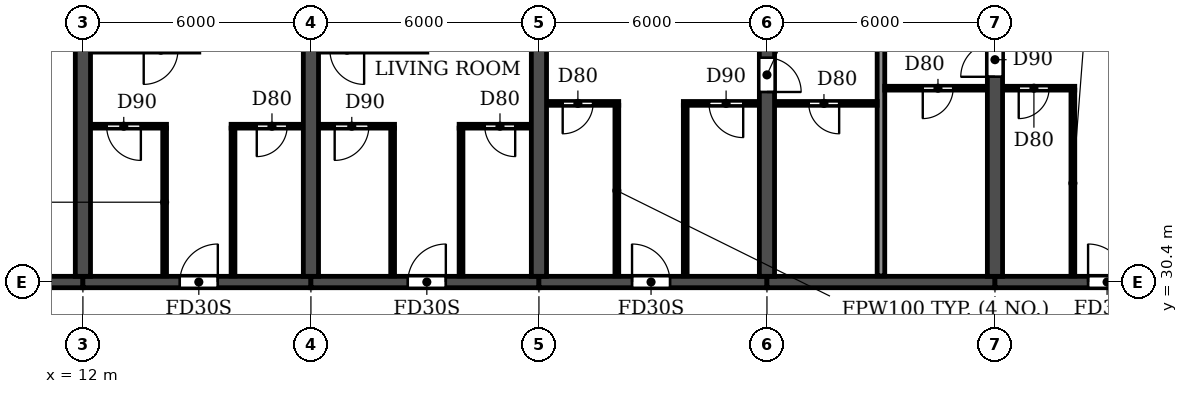
"""IFC4 building model, lengths in metres.
Left out: names, types, materials, properties, quantities, classifications, styles, units other than length and angle.
Written with IfcOpenShell. Run it as: python <this file> out.ifc"""

import sys

from ifc_helpers import new_model, si_unit, direction, frame, frame_2d, origin, place, context, subcontext, project, spatial, rectangle, extrude, element, fill, save


model = new_model("IFC4")
c1 = context("Model", 3, precision=1e-05, world=origin(), true_north=direction((0.0, 1.0)))
c2 = subcontext(c1, "Body", "Model", "MODEL_VIEW")
j1 = project(units=[si_unit("LENGTHUNIT", "METRE"), si_unit("PLANEANGLEUNIT", "RADIAN")], contexts=[c1])
p1 = place(None, origin())
s1 = spatial("IfcSite", under=j1, at=p1, CompositionType="ELEMENT")
p2 = place(p1, origin())
s2 = spatial("IfcBuilding", under=s1, at=p2, CompositionType="ELEMENT")
p3 = place(p2, frame((0.0, 0.0, 56.4)))
s3 = spatial("IfcBuildingStorey", under=s2, at=p3, CompositionType="ELEMENT", Elevation=56.4)
for number, where, z_axis, x_axis in (
    (1, (12.0, 30.55, 0.0), (0.0, 0.0, 1.0), (0.0, 1.0, 0.0)),
    (2, (18.0, 30.55, 0.0), (0.0, 0.0, 1.0), (0.0, 1.0, 0.0)),
    (3, (24.0, 30.55, 0.0), (0.0, 0.0, 1.0), (0.0, 1.0, 0.0)),
):
    element("IfcWall", number, at=place(p3, frame(where, z_axis=z_axis, x_axis=x_axis)), inside=s3, PredefinedType="SHEAR", context=c2, shape_type="SweptSolid", body=[
        extrude(rectangle(XDim=14.05, YDim=0.4, at=frame_2d((7.025, 0.0))), origin(), (0.0, 0.0, 1.0), 3.05),
    ])
p4 = place(p3, frame((30.0, 30.55, 0.0), z_axis=(0.0, 0.0, 1.0), x_axis=(0.0, 1.0, 0.0)))
e4 = element("IfcWall", 4, at=p4, inside=s3, PredefinedType="SHEAR", context=c2, shape_type="SweptSolid", body=[
    extrude(rectangle(XDim=14.05, YDim=0.4, at=frame_2d((7.025, 0.0))), origin(), (0.0, 0.0, 1.0), 3.05),
])
p5 = place(p4, frame((4.85, 0.0, 0.0)))
e5 = element("IfcOpeningElement", 5, at=p5, cuts=e4, PredefinedType="OPENING", context=c2, shape_type="SweptSolid", body=[
    extrude(rectangle(XDim=0.9, YDim=2.1, at=frame_2d((0.45, 1.05))), frame((0.0, 0.21, 0.0), z_axis=(0.0, -1.0, 0.0), x_axis=(1.0, 0.0, 0.0)), (0.0, 0.0, 1.0), 0.42),
])
p6 = place(p3, frame((36.0, 30.55, 0.0), z_axis=(0.0, 0.0, 1.0), x_axis=(0.0, 1.0, 0.0)))
e6 = element("IfcWall", 6, at=p6, inside=s3, PredefinedType="SHEAR", context=c2, shape_type="SweptSolid", body=[
    extrude(rectangle(XDim=14.05, YDim=0.4, at=frame_2d((7.025, 0.0))), origin(), (0.0, 0.0, 1.0), 3.05),
])
p7 = place(p6, frame((5.25, 0.0, 0.0)))
e7 = element("IfcOpeningElement", 7, at=p7, cuts=e6, PredefinedType="OPENING", context=c2, shape_type="SweptSolid", body=[
    extrude(rectangle(XDim=0.9, YDim=2.1, at=frame_2d((0.45, 1.05))), frame((0.0, 0.21, 0.0), z_axis=(0.0, -1.0, 0.0), x_axis=(1.0, 0.0, 0.0)), (0.0, 0.0, 1.0), 0.42),
])
p8 = place(p3, frame((6.2, 30.4, 0.0), z_axis=(0.0, 0.0, 1.0), x_axis=(1.0, 0.0, 0.0)))
e8 = element("IfcWall", 8, at=p8, inside=s3, PredefinedType="SHEAR", context=c2, shape_type="SweptSolid", body=[
    extrude(rectangle(XDim=5.8, YDim=0.3, at=frame_2d((2.9, 0.0))), origin(), (0.0, 0.0, 1.0), 2.45),
])
p9 = place(p8, frame((2.3, 0.0, 0.0)))
e9 = element("IfcOpeningElement", 9, at=p9, cuts=e8, PredefinedType="OPENING", context=c2, shape_type="SweptSolid", body=[
    extrude(rectangle(XDim=1.0, YDim=2.1, at=frame_2d((0.5, 1.05))), frame((0.0, 0.16, 0.0), z_axis=(0.0, -1.0, 0.0), x_axis=(1.0, 0.0, 0.0)), (0.0, 0.0, 1.0), 0.32),
])
p10 = place(p3, frame((12.0, 30.4, 0.0), z_axis=(0.0, 0.0, 1.0), x_axis=(1.0, 0.0, 0.0)))
e10 = element("IfcWall", 10, at=p10, inside=s3, PredefinedType="SHEAR", context=c2, shape_type="SweptSolid", body=[
    extrude(rectangle(XDim=6.0, YDim=0.3, at=frame_2d((3.0, 0.0))), origin(), (0.0, 0.0, 1.0), 2.45),
])
p11 = place(p10, frame((2.55, 0.0, 0.0)))
e11 = element("IfcOpeningElement", 11, at=p11, cuts=e10, PredefinedType="OPENING", context=c2, shape_type="SweptSolid", body=[
    extrude(rectangle(XDim=1.0, YDim=2.1, at=frame_2d((0.5, 1.05))), frame((0.0, 0.16, 0.0), z_axis=(0.0, -1.0, 0.0), x_axis=(1.0, 0.0, 0.0)), (0.0, 0.0, 1.0), 0.32),
])
p12 = place(p3, frame((18.0, 30.4, 0.0), z_axis=(0.0, 0.0, 1.0), x_axis=(1.0, 0.0, 0.0)))
e12 = element("IfcWall", 12, at=p12, inside=s3, PredefinedType="SHEAR", context=c2, shape_type="SweptSolid", body=[
    extrude(rectangle(XDim=6.0, YDim=0.3, at=frame_2d((3.0, 0.0))), origin(), (0.0, 0.0, 1.0), 2.45),
])
p13 = place(p12, frame((2.55, 0.0, 0.0)))
e13 = element("IfcOpeningElement", 13, at=p13, cuts=e12, PredefinedType="OPENING", context=c2, shape_type="SweptSolid", body=[
    extrude(rectangle(XDim=1.0, YDim=2.1, at=frame_2d((0.5, 1.05))), frame((0.0, 0.16, 0.0), z_axis=(0.0, -1.0, 0.0), x_axis=(1.0, 0.0, 0.0)), (0.0, 0.0, 1.0), 0.32),
])
p14 = place(p3, frame((24.0, 30.4, 0.0), z_axis=(0.0, 0.0, 1.0), x_axis=(1.0, 0.0, 0.0)))
e14 = element("IfcWall", 14, at=p14, inside=s3, PredefinedType="SHEAR", context=c2, shape_type="SweptSolid", body=[
    extrude(rectangle(XDim=6.0, YDim=0.3, at=frame_2d((3.0, 0.0))), origin(), (0.0, 0.0, 1.0), 2.45),
])
p15 = place(p14, frame((2.45, 0.0, 0.0)))
e15 = element("IfcOpeningElement", 15, at=p15, cuts=e14, PredefinedType="OPENING", context=c2, shape_type="SweptSolid", body=[
    extrude(rectangle(XDim=1.0, YDim=2.1, at=frame_2d((0.5, 1.05))), frame((0.0, 0.16, 0.0), z_axis=(0.0, -1.0, 0.0), x_axis=(1.0, 0.0, 0.0)), (0.0, 0.0, 1.0), 0.32),
])
p16 = place(p3, frame((30.0, 30.4, 0.0), z_axis=(0.0, 0.0, 1.0), x_axis=(1.0, 0.0, 0.0)))
e16 = element("IfcWall", 16, at=p16, inside=s3, PredefinedType="SHEAR", context=c2, shape_type="SweptSolid", body=[
    extrude(rectangle(XDim=6.0, YDim=0.3, at=frame_2d((3.0, 0.0))), origin(), (0.0, 0.0, 1.0), 2.45),
])
p17 = place(p3, frame((36.0, 30.4, 0.0), z_axis=(0.0, 0.0, 1.0), x_axis=(1.0, 0.0, 0.0)))
e17 = element("IfcWall", 17, at=p17, inside=s3, PredefinedType="SHEAR", context=c2, shape_type="SweptSolid", body=[
    extrude(rectangle(XDim=6.0, YDim=0.3, at=frame_2d((3.0, 0.0))), origin(), (0.0, 0.0, 1.0), 2.45),
])
p18 = place(p17, frame((2.45, 0.0, 0.0)))
e18 = element("IfcOpeningElement", 18, at=p18, cuts=e17, PredefinedType="OPENING", context=c2, shape_type="SweptSolid", body=[
    extrude(rectangle(XDim=1.0, YDim=2.1, at=frame_2d((0.5, 1.05))), frame((0.0, 0.16, 0.0), z_axis=(0.0, -1.0, 0.0), x_axis=(1.0, 0.0, 0.0)), (0.0, 0.0, 1.0), 0.32),
])
p19 = place(p3, frame((33.0, 30.56, 0.0), z_axis=(0.0, 0.0, 1.0), x_axis=(0.0, 1.0, 0.0)))
e19 = element("IfcWall", 19, at=p19, inside=s3, PredefinedType="PARTITIONING", context=c2, shape_type="SweptSolid", body=[
    extrude(rectangle(XDim=14.18, YDim=0.2, at=frame_2d((7.09, 0.0))), origin(), (0.0, 0.0, 1.0), 3.05),
])
p20 = place(p3, frame((12.21, 34.5, 0.0), z_axis=(0.0, 0.0, 1.0), x_axis=(1.0, 0.0, 0.0)))
e20 = element("IfcWall", 20, at=p20, inside=s3, PredefinedType="PARTITIONING", context=c2, shape_type="SweptSolid", body=[
    extrude(rectangle(XDim=1.99, YDim=0.1, at=frame_2d((0.995, 0.0))), origin(), (0.0, 0.0, 1.0), 3.05),
])
p21 = place(p20, frame((0.415, 0.0, 0.0)))
e21 = element("IfcOpeningElement", 21, at=p21, cuts=e20, PredefinedType="OPENING", context=c2, shape_type="SweptSolid", body=[
    extrude(rectangle(XDim=0.9, YDim=2.1, at=frame_2d((0.45, 1.05))), frame((0.0, 0.06, 0.0), z_axis=(0.0, -1.0, 0.0), x_axis=(1.0, 0.0, 0.0)), (0.0, 0.0, 1.0), 0.12),
])
p22 = place(p3, frame((15.9, 34.5, 0.0), z_axis=(0.0, 0.0, 1.0), x_axis=(1.0, 0.0, 0.0)))
e22 = element("IfcWall", 22, at=p22, inside=s3, PredefinedType="PARTITIONING", context=c2, shape_type="SweptSolid", body=[
    extrude(rectangle(XDim=1.89, YDim=0.1, at=frame_2d((0.945, 0.0))), origin(), (0.0, 0.0, 1.0), 3.05),
])
p23 = place(p22, frame((0.675, 0.0, 0.0)))
e23 = element("IfcOpeningElement", 23, at=p23, cuts=e22, PredefinedType="OPENING", context=c2, shape_type="SweptSolid", body=[
    extrude(rectangle(XDim=0.8, YDim=2.1, at=frame_2d((0.4, 1.05))), frame((0.0, 0.06, 0.0), z_axis=(0.0, -1.0, 0.0), x_axis=(1.0, 0.0, 0.0)), (0.0, 0.0, 1.0), 0.12),
])
p24 = place(p3, frame((18.21, 34.5, 0.0), z_axis=(0.0, 0.0, 1.0), x_axis=(1.0, 0.0, 0.0)))
e24 = element("IfcWall", 24, at=p24, inside=s3, PredefinedType="PARTITIONING", context=c2, shape_type="SweptSolid", body=[
    extrude(rectangle(XDim=1.99, YDim=0.1, at=frame_2d((0.995, 0.0))), origin(), (0.0, 0.0, 1.0), 3.05),
])
p25 = place(p24, frame((0.415, 0.0, 0.0)))
e25 = element("IfcOpeningElement", 25, at=p25, cuts=e24, PredefinedType="OPENING", context=c2, shape_type="SweptSolid", body=[
    extrude(rectangle(XDim=0.9, YDim=2.1, at=frame_2d((0.45, 1.05))), frame((0.0, 0.06, 0.0), z_axis=(0.0, -1.0, 0.0), x_axis=(1.0, 0.0, 0.0)), (0.0, 0.0, 1.0), 0.12),
])
p26 = place(p3, frame((21.9, 34.5, 0.0), z_axis=(0.0, 0.0, 1.0), x_axis=(1.0, 0.0, 0.0)))
e26 = element("IfcWall", 26, at=p26, inside=s3, PredefinedType="PARTITIONING", context=c2, shape_type="SweptSolid", body=[
    extrude(rectangle(XDim=1.89, YDim=0.1, at=frame_2d((0.945, 0.0))), origin(), (0.0, 0.0, 1.0), 3.05),
])
p27 = place(p26, frame((0.675, 0.0, 0.0)))
e27 = element("IfcOpeningElement", 27, at=p27, cuts=e26, PredefinedType="OPENING", context=c2, shape_type="SweptSolid", body=[
    extrude(rectangle(XDim=0.8, YDim=2.1, at=frame_2d((0.4, 1.05))), frame((0.0, 0.06, 0.0), z_axis=(0.0, -1.0, 0.0), x_axis=(1.0, 0.0, 0.0)), (0.0, 0.0, 1.0), 0.12),
])
p28 = place(p3, frame((24.21, 35.1, 0.0), z_axis=(0.0, 0.0, 1.0), x_axis=(1.0, 0.0, 0.0)))
e28 = element("IfcWall", 28, at=p28, inside=s3, PredefinedType="PARTITIONING", context=c2, shape_type="SweptSolid", body=[
    extrude(rectangle(XDim=1.89, YDim=0.1, at=frame_2d((0.945, 0.0))), origin(), (0.0, 0.0, 1.0), 3.05),
])
p29 = place(p28, frame((0.415, 0.0, 0.0)))
e29 = element("IfcOpeningElement", 29, at=p29, cuts=e28, PredefinedType="OPENING", context=c2, shape_type="SweptSolid", body=[
    extrude(rectangle(XDim=0.8, YDim=2.1, at=frame_2d((0.4, 1.05))), frame((0.0, 0.06, 0.0), z_axis=(0.0, -1.0, 0.0), x_axis=(1.0, 0.0, 0.0)), (0.0, 0.0, 1.0), 0.12),
])
p30 = place(p3, frame((27.8, 35.1, 0.0), z_axis=(0.0, 0.0, 1.0), x_axis=(1.0, 0.0, 0.0)))
e30 = element("IfcWall", 30, at=p30, inside=s3, PredefinedType="PARTITIONING", context=c2, shape_type="SweptSolid", body=[
    extrude(rectangle(XDim=1.99, YDim=0.1, at=frame_2d((0.995, 0.0))), origin(), (0.0, 0.0, 1.0), 3.05),
])
p31 = place(p30, frame((0.675, 0.0, 0.0)))
e31 = element("IfcOpeningElement", 31, at=p31, cuts=e30, PredefinedType="OPENING", context=c2, shape_type="SweptSolid", body=[
    extrude(rectangle(XDim=0.9, YDim=2.1, at=frame_2d((0.45, 1.05))), frame((0.0, 0.06, 0.0), z_axis=(0.0, -1.0, 0.0), x_axis=(1.0, 0.0, 0.0)), (0.0, 0.0, 1.0), 0.12),
])
p32 = place(p3, frame((30.21, 35.1, 0.0), z_axis=(0.0, 0.0, 1.0), x_axis=(1.0, 0.0, 0.0)))
e32 = element("IfcWall", 32, at=p32, inside=s3, PredefinedType="PARTITIONING", context=c2, shape_type="SweptSolid", body=[
    extrude(rectangle(XDim=2.69, YDim=0.1, at=frame_2d((1.345, 0.0))), origin(), (0.0, 0.0, 1.0), 3.05),
])
p33 = place(p32, frame((0.89, 0.0, 0.0)))
e33 = element("IfcOpeningElement", 33, at=p33, cuts=e32, PredefinedType="OPENING", context=c2, shape_type="SweptSolid", body=[
    extrude(rectangle(XDim=0.8, YDim=2.1, at=frame_2d((0.4, 1.05))), frame((0.0, 0.06, 0.0), z_axis=(0.0, -1.0, 0.0), x_axis=(1.0, 0.0, 0.0)), (0.0, 0.0, 1.0), 0.12),
])
p34 = place(p3, frame((33.1, 35.5, 0.0), z_axis=(0.0, 0.0, 1.0), x_axis=(1.0, 0.0, 0.0)))
e34 = element("IfcWall", 34, at=p34, inside=s3, PredefinedType="PARTITIONING", context=c2, shape_type="SweptSolid", body=[
    extrude(rectangle(XDim=2.69, YDim=0.1, at=frame_2d((1.345, 0.0))), origin(), (0.0, 0.0, 1.0), 3.05),
])
p35 = place(p34, frame((1.0, 0.0, 0.0)))
e35 = element("IfcOpeningElement", 35, at=p35, cuts=e34, PredefinedType="OPENING", context=c2, shape_type="SweptSolid", body=[
    extrude(rectangle(XDim=0.8, YDim=2.1, at=frame_2d((0.4, 1.05))), frame((0.0, 0.06, 0.0), z_axis=(0.0, -1.0, 0.0), x_axis=(1.0, 0.0, 0.0)), (0.0, 0.0, 1.0), 0.12),
])
p36 = place(p3, frame((36.21, 35.5, 0.0), z_axis=(0.0, 0.0, 1.0), x_axis=(1.0, 0.0, 0.0)))
e36 = element("IfcWall", 36, at=p36, inside=s3, PredefinedType="PARTITIONING", context=c2, shape_type="SweptSolid", body=[
    extrude(rectangle(XDim=1.89, YDim=0.1, at=frame_2d((0.945, 0.0))), origin(), (0.0, 0.0, 1.0), 3.05),
])
p37 = place(p36, frame((0.415, 0.0, 0.0)))
e37 = element("IfcOpeningElement", 37, at=p37, cuts=e36, PredefinedType="OPENING", context=c2, shape_type="SweptSolid", body=[
    extrude(rectangle(XDim=0.8, YDim=2.1, at=frame_2d((0.4, 1.05))), frame((0.0, 0.06, 0.0), z_axis=(0.0, -1.0, 0.0), x_axis=(1.0, 0.0, 0.0)), (0.0, 0.0, 1.0), 0.12),
])
for number, where, z_axis, x_axis in (
    (38, (14.15, 30.56, 0.0), (0.0, 0.0, 1.0), (0.0, 1.0, 0.0)),
    (39, (15.95, 30.56, 0.0), (0.0, 0.0, 1.0), (0.0, 1.0, 0.0)),
    (40, (20.15, 30.56, 0.0), (0.0, 0.0, 1.0), (0.0, 1.0, 0.0)),
    (41, (21.95, 30.56, 0.0), (0.0, 0.0, 1.0), (0.0, 1.0, 0.0)),
):
    element("IfcWall", number, at=place(p3, frame(where, z_axis=z_axis, x_axis=x_axis)), inside=s3, PredefinedType="PARTITIONING", context=c2, shape_type="SweptSolid", body=[
        extrude(rectangle(XDim=3.89, YDim=0.1, at=frame_2d((1.945, 0.0))), origin(), (0.0, 0.0, 1.0), 3.05),
    ])
for number, where, z_axis, x_axis in (
    (42, (26.05, 30.56, 0.0), (0.0, 0.0, 1.0), (0.0, 1.0, 0.0)),
    (43, (27.85, 30.56, 0.0), (0.0, 0.0, 1.0), (0.0, 1.0, 0.0)),
):
    element("IfcWall", number, at=place(p3, frame(where, z_axis=z_axis, x_axis=x_axis)), inside=s3, PredefinedType="PARTITIONING", context=c2, shape_type="SweptSolid", body=[
        extrude(rectangle(XDim=4.49, YDim=0.1, at=frame_2d((2.245, 0.0))), origin(), (0.0, 0.0, 1.0), 3.05),
    ])
p38 = place(p3, frame((38.05, 30.56, 0.0), z_axis=(0.0, 0.0, 1.0), x_axis=(0.0, 1.0, 0.0)))
e44 = element("IfcWall", 44, at=p38, inside=s3, PredefinedType="PARTITIONING", context=c2, shape_type="SweptSolid", body=[
    extrude(rectangle(XDim=4.89, YDim=0.1, at=frame_2d((2.445, 0.0))), origin(), (0.0, 0.0, 1.0), 3.05),
])
p39 = place(p21, frame((0.9, 0.0, 0.0), z_axis=(0.0, 0.0, 1.0), x_axis=(-1.0, 0.0, 0.0)))
e45 = element("IfcDoor", 45, at=p39, inside=s3, OperationType="SINGLE_SWING_LEFT", PredefinedType="DOOR", context=c2, shape_type="SweptSolid", body=[
    extrude(rectangle(XDim=0.9, YDim=2.1, at=frame_2d((0.45, 1.05))), frame((0.0, 0.025, 0.0), z_axis=(0.0, -1.0, 0.0), x_axis=(1.0, 0.0, 0.0)), (0.0, 0.0, 1.0), 0.05),
])
fill(e21, e45)
p40 = place(p11, origin())
e46 = element("IfcDoor", 46, at=p40, inside=s3, OperationType="SINGLE_SWING_RIGHT", PredefinedType="DOOR", context=c2, shape_type="SweptSolid", body=[
    extrude(rectangle(XDim=1.0, YDim=2.1, at=frame_2d((0.5, 1.05))), frame((0.0, 0.025, 0.0), z_axis=(0.0, -1.0, 0.0), x_axis=(1.0, 0.0, 0.0)), (0.0, 0.0, 1.0), 0.05),
])
fill(e11, e46)
p41 = place(p23, frame((0.8, 0.0, 0.0), z_axis=(0.0, 0.0, 1.0), x_axis=(-1.0, 0.0, 0.0)))
e47 = element("IfcDoor", 47, at=p41, inside=s3, OperationType="SINGLE_SWING_RIGHT", PredefinedType="DOOR", context=c2, shape_type="SweptSolid", body=[
    extrude(rectangle(XDim=0.8, YDim=2.1, at=frame_2d((0.4, 1.05))), frame((0.0, 0.025, 0.0), z_axis=(0.0, -1.0, 0.0), x_axis=(1.0, 0.0, 0.0)), (0.0, 0.0, 1.0), 0.05),
])
fill(e23, e47)
p42 = place(p25, frame((0.9, 0.0, 0.0), z_axis=(0.0, 0.0, 1.0), x_axis=(-1.0, 0.0, 0.0)))
e48 = element("IfcDoor", 48, at=p42, inside=s3, OperationType="SINGLE_SWING_RIGHT", PredefinedType="DOOR", context=c2, shape_type="SweptSolid", body=[
    extrude(rectangle(XDim=0.9, YDim=2.1, at=frame_2d((0.45, 1.05))), frame((0.0, 0.025, 0.0), z_axis=(0.0, -1.0, 0.0), x_axis=(1.0, 0.0, 0.0)), (0.0, 0.0, 1.0), 0.05),
])
fill(e25, e48)
p43 = place(p13, origin())
e49 = element("IfcDoor", 49, at=p43, inside=s3, OperationType="SINGLE_SWING_RIGHT", PredefinedType="DOOR", context=c2, shape_type="SweptSolid", body=[
    extrude(rectangle(XDim=1.0, YDim=2.1, at=frame_2d((0.5, 1.05))), frame((0.0, 0.025, 0.0), z_axis=(0.0, -1.0, 0.0), x_axis=(1.0, 0.0, 0.0)), (0.0, 0.0, 1.0), 0.05),
])
fill(e13, e49)
p44 = place(p27, frame((0.8, 0.0, 0.0), z_axis=(0.0, 0.0, 1.0), x_axis=(-1.0, 0.0, 0.0)))
e50 = element("IfcDoor", 50, at=p44, inside=s3, OperationType="SINGLE_SWING_LEFT", PredefinedType="DOOR", context=c2, shape_type="SweptSolid", body=[
    extrude(rectangle(XDim=0.8, YDim=2.1, at=frame_2d((0.4, 1.05))), frame((0.0, 0.025, 0.0), z_axis=(0.0, -1.0, 0.0), x_axis=(1.0, 0.0, 0.0)), (0.0, 0.0, 1.0), 0.05),
])
fill(e27, e50)
p45 = place(p33, frame((0.8, 0.0, 0.0), z_axis=(0.0, 0.0, 1.0), x_axis=(-1.0, 0.0, 0.0)))
e51 = element("IfcDoor", 51, at=p45, inside=s3, OperationType="SINGLE_SWING_LEFT", PredefinedType="DOOR", context=c2, shape_type="SweptSolid", body=[
    extrude(rectangle(XDim=0.8, YDim=2.1, at=frame_2d((0.4, 1.05))), frame((0.0, 0.025, 0.0), z_axis=(0.0, -1.0, 0.0), x_axis=(1.0, 0.0, 0.0)), (0.0, 0.0, 1.0), 0.05),
])
fill(e33, e51)
p46 = place(p29, frame((0.8, 0.0, 0.0), z_axis=(0.0, 0.0, 1.0), x_axis=(-1.0, 0.0, 0.0)))
e52 = element("IfcDoor", 52, at=p46, inside=s3, OperationType="SINGLE_SWING_RIGHT", PredefinedType="DOOR", context=c2, shape_type="SweptSolid", body=[
    extrude(rectangle(XDim=0.8, YDim=2.1, at=frame_2d((0.4, 1.05))), frame((0.0, 0.025, 0.0), z_axis=(0.0, -1.0, 0.0), x_axis=(1.0, 0.0, 0.0)), (0.0, 0.0, 1.0), 0.05),
])
fill(e29, e52)
p47 = place(p15, origin())
e53 = element("IfcDoor", 53, at=p47, inside=s3, OperationType="SINGLE_SWING_LEFT", PredefinedType="DOOR", context=c2, shape_type="SweptSolid", body=[
    extrude(rectangle(XDim=1.0, YDim=2.1, at=frame_2d((0.5, 1.05))), frame((0.0, 0.025, 0.0), z_axis=(0.0, -1.0, 0.0), x_axis=(1.0, 0.0, 0.0)), (0.0, 0.0, 1.0), 0.05),
])
fill(e15, e53)
p48 = place(p31, frame((0.9, 0.0, 0.0), z_axis=(0.0, 0.0, 1.0), x_axis=(-1.0, 0.0, 0.0)))
e54 = element("IfcDoor", 54, at=p48, inside=s3, OperationType="SINGLE_SWING_LEFT", PredefinedType="DOOR", context=c2, shape_type="SweptSolid", body=[
    extrude(rectangle(XDim=0.9, YDim=2.1, at=frame_2d((0.45, 1.05))), frame((0.0, 0.025, 0.0), z_axis=(0.0, -1.0, 0.0), x_axis=(1.0, 0.0, 0.0)), (0.0, 0.0, 1.0), 0.05),
])
fill(e31, e54)
p49 = place(p5, frame((0.9, 0.0, 0.0), z_axis=(0.0, 0.0, 1.0), x_axis=(-1.0, 0.0, 0.0)))
e55 = element("IfcDoor", 55, at=p49, inside=s3, OperationType="SINGLE_SWING_RIGHT", PredefinedType="DOOR", context=c2, shape_type="SweptSolid", body=[
    extrude(rectangle(XDim=0.9, YDim=2.1, at=frame_2d((0.45, 1.05))), frame((0.0, 0.025, 0.0), z_axis=(0.0, -1.0, 0.0), x_axis=(1.0, 0.0, 0.0)), (0.0, 0.0, 1.0), 0.05),
])
fill(e5, e55)
p50 = place(p35, frame((0.8, 0.0, 0.0), z_axis=(0.0, 0.0, 1.0), x_axis=(-1.0, 0.0, 0.0)))
e56 = element("IfcDoor", 56, at=p50, inside=s3, OperationType="SINGLE_SWING_RIGHT", PredefinedType="DOOR", context=c2, shape_type="SweptSolid", body=[
    extrude(rectangle(XDim=0.8, YDim=2.1, at=frame_2d((0.4, 1.05))), frame((0.0, 0.025, 0.0), z_axis=(0.0, -1.0, 0.0), x_axis=(1.0, 0.0, 0.0)), (0.0, 0.0, 1.0), 0.05),
])
fill(e35, e56)
p51 = place(p7, origin())
e57 = element("IfcDoor", 57, at=p51, inside=s3, OperationType="SINGLE_SWING_LEFT", PredefinedType="DOOR", context=c2, shape_type="SweptSolid", body=[
    extrude(rectangle(XDim=0.9, YDim=2.1, at=frame_2d((0.45, 1.05))), frame((0.0, 0.025, 0.0), z_axis=(0.0, -1.0, 0.0), x_axis=(1.0, 0.0, 0.0)), (0.0, 0.0, 1.0), 0.05),
])
fill(e7, e57)
p52 = place(p37, frame((0.8, 0.0, 0.0), z_axis=(0.0, 0.0, 1.0), x_axis=(-1.0, 0.0, 0.0)))
e58 = element("IfcDoor", 58, at=p52, inside=s3, OperationType="SINGLE_SWING_RIGHT", PredefinedType="DOOR", context=c2, shape_type="SweptSolid", body=[
    extrude(rectangle(XDim=0.8, YDim=2.1, at=frame_2d((0.4, 1.05))), frame((0.0, 0.025, 0.0), z_axis=(0.0, -1.0, 0.0), x_axis=(1.0, 0.0, 0.0)), (0.0, 0.0, 1.0), 0.05),
])
fill(e37, e58)
p53 = place(p18, origin())
e59 = element("IfcDoor", 59, at=p53, inside=s3, OperationType="SINGLE_SWING_LEFT", PredefinedType="DOOR", context=c2, shape_type="SweptSolid", body=[
    extrude(rectangle(XDim=1.0, YDim=2.1, at=frame_2d((0.5, 1.05))), frame((0.0, 0.025, 0.0), z_axis=(0.0, -1.0, 0.0), x_axis=(1.0, 0.0, 0.0)), (0.0, 0.0, 1.0), 0.05),
])
fill(e18, e59)
save(model, sys.argv[1])
